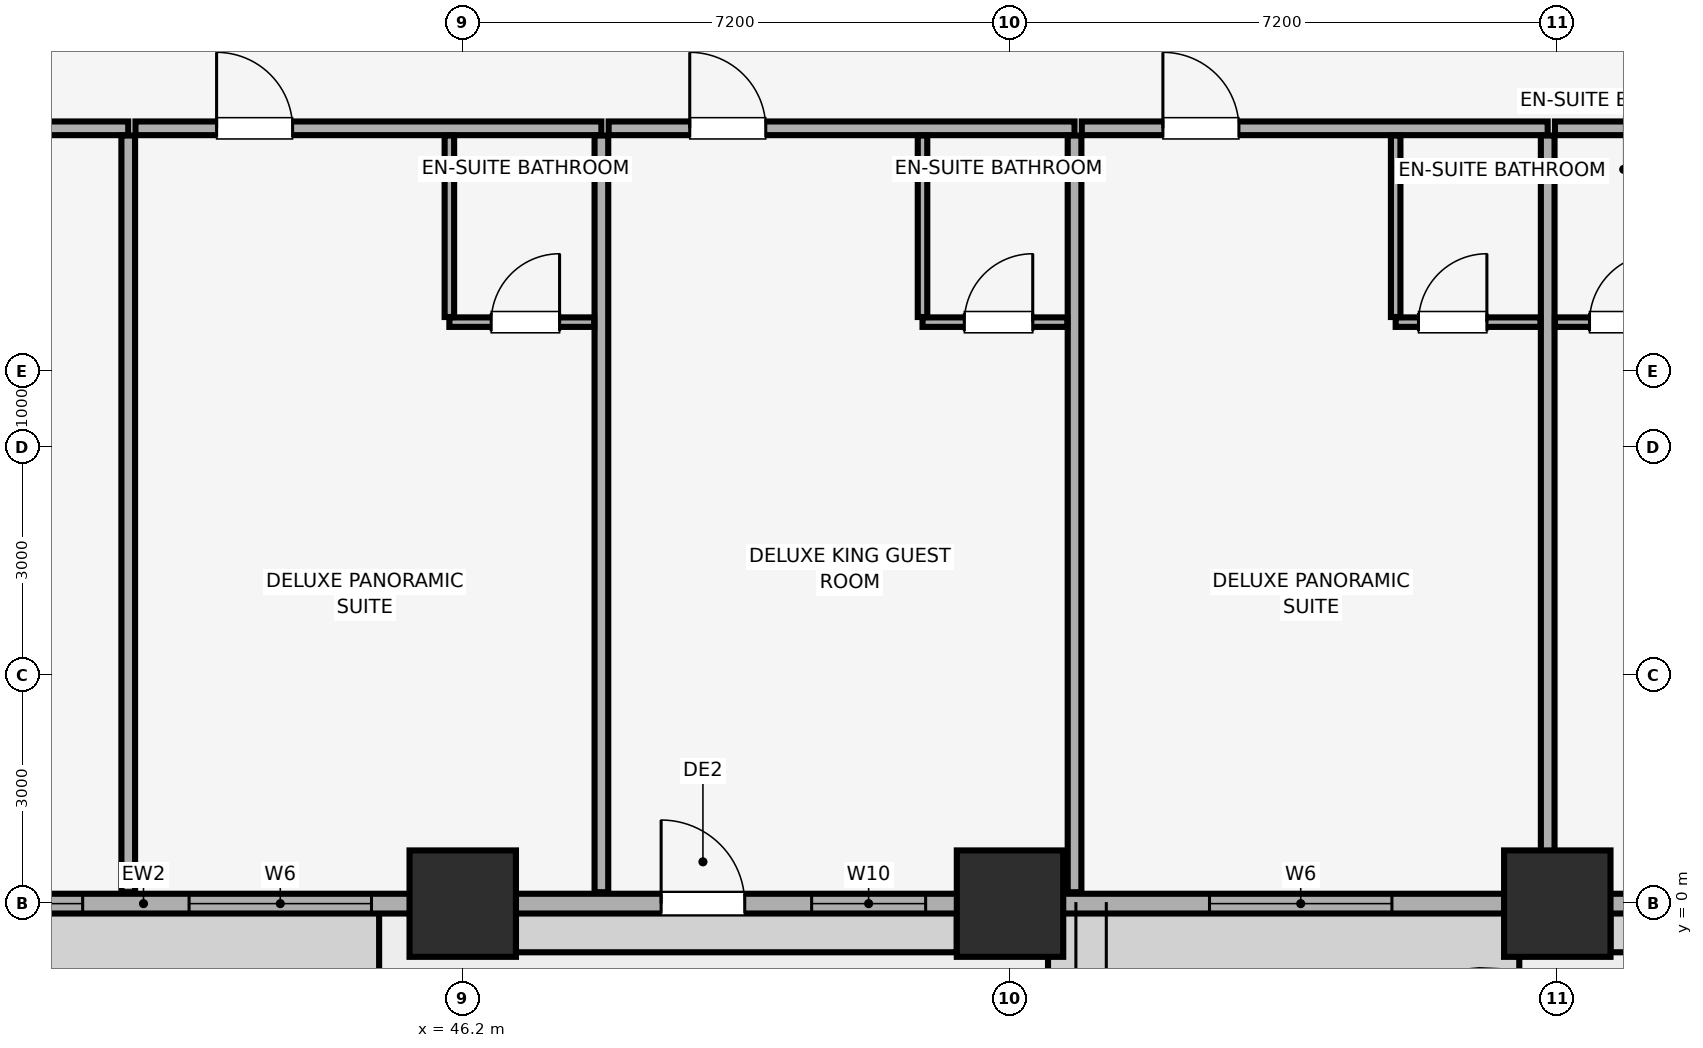
"""IFC4 building model, lengths in metres.
Left out: names, types, materials, properties, quantities, classifications, styles, units other than length and angle.
Written with IfcOpenShell. Run it as: python <this file> out.ifc"""

import sys

from ifc_helpers import new_model, si_unit, direction, frame, frame_2d, origin, origin_2d, place, context, subcontext, project, spatial, rectangle, extrude, element, fill, save


model = new_model("IFC4")
c1 = context("Model", 3, precision=1e-05, world=origin(), true_north=direction((0.0, 1.0)))
c2 = subcontext(c1, "Body", "Model", "MODEL_VIEW")
j1 = project(units=[si_unit("LENGTHUNIT", "METRE"), si_unit("PLANEANGLEUNIT", "RADIAN")], contexts=[c1])
p1 = place(None, origin())
s1 = spatial("IfcSite", under=j1, at=p1, CompositionType="ELEMENT")
p2 = place(p1, origin())
s2 = spatial("IfcBuilding", under=s1, at=p2, CompositionType="ELEMENT")
p3 = place(p2, frame((0.0, 0.0, 46.4)))
s3 = spatial("IfcBuildingStorey", under=s2, at=p3, CompositionType="ELEMENT", Elevation=46.4)
for number, where, z_axis, x_axis in (
    (1, (46.2, 0.0, 0.0), (0.0, 0.0, 1.0), (1.0, 0.0, 0.0)),
    (2, (53.4, 0.0, 0.0), (0.0, 0.0, 1.0), (1.0, 0.0, 0.0)),
    (3, (60.6, 0.0, 0.0), (0.0, 0.0, 1.0), (1.0, 0.0, 0.0)),
):
    element("IfcColumn", number, at=place(p3, frame(where, z_axis=z_axis, x_axis=x_axis)), inside=s3, PredefinedType="COLUMN", context=c2, shape_type="SweptSolid", body=[
        extrude(rectangle(XDim=1.4, YDim=1.4, at=origin_2d()), origin(), (0.0, 0.0, 1.0), 3.51),
    ])
p4 = place(p3, frame((4.2, 0.0, 0.0), z_axis=(0.0, 0.0, 1.0), x_axis=(1.0, 0.0, 0.0)))
e4 = element("IfcWall", 4, at=p4, inside=s3, PredefinedType="SOLIDWALL", context=c2, shape_type="SweptSolid", body=[
    extrude(rectangle(XDim=75.6, YDim=0.26, at=frame_2d((37.8, 0.0))), origin(), (0.0, 0.0, 1.0), 2.56),
])
p5 = place(p4, frame((22.948, 0.0, 0.0)))
e5 = element("IfcOpeningElement", 5, at=p5, cuts=e4, PredefinedType="OPENING", context=c2, shape_type="SweptSolid", body=[
    extrude(rectangle(XDim=1.1, YDim=2.15, at=frame_2d((0.55, 1.075))), frame((0.0, 0.14, 0.0), z_axis=(0.0, -1.0, 0.0), x_axis=(1.0, 0.0, 0.0)), (0.0, 0.0, 1.0), 0.28),
])
p6 = place(p4, frame((44.61, 0.0, 0.0)))
e6 = element("IfcOpeningElement", 6, at=p6, cuts=e4, PredefinedType="OPENING", context=c2, shape_type="SweptSolid", body=[
    extrude(rectangle(XDim=1.1, YDim=2.15, at=frame_2d((0.55, 1.075))), frame((0.0, 0.14, 0.0), z_axis=(0.0, -1.0, 0.0), x_axis=(1.0, 0.0, 0.0)), (0.0, 0.0, 1.0), 0.28),
])
p7 = place(p4, frame((66.272, 0.0, 0.0)))
e7 = element("IfcOpeningElement", 7, at=p7, cuts=e4, PredefinedType="OPENING", context=c2, shape_type="SweptSolid", body=[
    extrude(rectangle(XDim=1.1, YDim=2.15, at=frame_2d((0.55, 1.075))), frame((0.0, 0.14, 0.0), z_axis=(0.0, -1.0, 0.0), x_axis=(1.0, 0.0, 0.0)), (0.0, 0.0, 1.0), 0.28),
])
p8 = place(p4, frame((1.035, 0.0, 0.85)))
e8 = element("IfcOpeningElement", 8, at=p8, cuts=e4, PredefinedType="OPENING", context=c2, shape_type="SweptSolid", body=[
    extrude(rectangle(XDim=2.4, YDim=1.5, at=frame_2d((1.2, 0.75))), frame((0.0, 0.14, 0.0), z_axis=(0.0, -1.0, 0.0), x_axis=(1.0, 0.0, 0.0)), (0.0, 0.0, 1.0), 0.28),
])
p9 = place(p4, frame((7.837, 0.0, 0.85)))
e9 = element("IfcOpeningElement", 9, at=p9, cuts=e4, PredefinedType="OPENING", context=c2, shape_type="SweptSolid", body=[
    extrude(rectangle(XDim=2.4, YDim=1.5, at=frame_2d((1.2, 0.75))), frame((0.0, 0.14, 0.0), z_axis=(0.0, -1.0, 0.0), x_axis=(1.0, 0.0, 0.0)), (0.0, 0.0, 1.0), 0.28),
])
p10 = place(p4, frame((14.55, 0.0, 0.85)))
e10 = element("IfcOpeningElement", 10, at=p10, cuts=e4, PredefinedType="OPENING", context=c2, shape_type="SweptSolid", body=[
    extrude(rectangle(XDim=2.4, YDim=1.5, at=frame_2d((1.2, 0.75))), frame((0.0, 0.14, 0.0), z_axis=(0.0, -1.0, 0.0), x_axis=(1.0, 0.0, 0.0)), (0.0, 0.0, 1.0), 0.28),
])
p11 = place(p4, frame((20.439, 0.0, 0.85)))
e11 = element("IfcOpeningElement", 11, at=p11, cuts=e4, PredefinedType="OPENING", context=c2, shape_type="SweptSolid", body=[
    extrude(rectangle(XDim=1.5, YDim=1.4, at=frame_2d((0.75, 0.7))), frame((0.0, 0.14, 0.0), z_axis=(0.0, -1.0, 0.0), x_axis=(1.0, 0.0, 0.0)), (0.0, 0.0, 1.0), 0.28),
])
p12 = place(p4, frame((27.887, 0.0, 0.85)))
e12 = element("IfcOpeningElement", 12, at=p12, cuts=e4, PredefinedType="OPENING", context=c2, shape_type="SweptSolid", body=[
    extrude(rectangle(XDim=2.4, YDim=1.5, at=frame_2d((1.2, 0.75))), frame((0.0, 0.14, 0.0), z_axis=(0.0, -1.0, 0.0), x_axis=(1.0, 0.0, 0.0)), (0.0, 0.0, 1.0), 0.28),
])
p13 = place(p4, frame((34.6, 0.0, 0.85)))
e13 = element("IfcOpeningElement", 13, at=p13, cuts=e4, PredefinedType="OPENING", context=c2, shape_type="SweptSolid", body=[
    extrude(rectangle(XDim=2.4, YDim=1.5, at=frame_2d((1.2, 0.75))), frame((0.0, 0.14, 0.0), z_axis=(0.0, -1.0, 0.0), x_axis=(1.0, 0.0, 0.0)), (0.0, 0.0, 1.0), 0.28),
])
p14 = place(p4, frame((38.399, 0.0, 0.85)))
e14 = element("IfcOpeningElement", 14, at=p14, cuts=e4, PredefinedType="OPENING", context=c2, shape_type="SweptSolid", body=[
    extrude(rectangle(XDim=2.4, YDim=1.5, at=frame_2d((1.2, 0.75))), frame((0.0, 0.14, 0.0), z_axis=(0.0, -1.0, 0.0), x_axis=(1.0, 0.0, 0.0)), (0.0, 0.0, 1.0), 0.28),
])
p15 = place(p4, frame((46.59, 0.0, 0.85)))
e15 = element("IfcOpeningElement", 15, at=p15, cuts=e4, PredefinedType="OPENING", context=c2, shape_type="SweptSolid", body=[
    extrude(rectangle(XDim=1.5, YDim=1.4, at=frame_2d((0.75, 0.7))), frame((0.0, 0.14, 0.0), z_axis=(0.0, -1.0, 0.0), x_axis=(1.0, 0.0, 0.0)), (0.0, 0.0, 1.0), 0.28),
])
p16 = place(p4, frame((51.824, 0.0, 0.85)))
e16 = element("IfcOpeningElement", 16, at=p16, cuts=e4, PredefinedType="OPENING", context=c2, shape_type="SweptSolid", body=[
    extrude(rectangle(XDim=2.4, YDim=1.5, at=frame_2d((1.2, 0.75))), frame((0.0, 0.14, 0.0), z_axis=(0.0, -1.0, 0.0), x_axis=(1.0, 0.0, 0.0)), (0.0, 0.0, 1.0), 0.28),
])
p17 = place(p4, frame((58.449, 0.0, 0.85)))
e17 = element("IfcOpeningElement", 17, at=p17, cuts=e4, PredefinedType="OPENING", context=c2, shape_type="SweptSolid", body=[
    extrude(rectangle(XDim=2.4, YDim=1.5, at=frame_2d((1.2, 0.75))), frame((0.0, 0.14, 0.0), z_axis=(0.0, -1.0, 0.0), x_axis=(1.0, 0.0, 0.0)), (0.0, 0.0, 1.0), 0.28),
])
p18 = place(p4, frame((72.165, 0.0, 0.85)))
e18 = element("IfcOpeningElement", 18, at=p18, cuts=e4, PredefinedType="OPENING", context=c2, shape_type="SweptSolid", body=[
    extrude(rectangle(XDim=2.4, YDim=1.5, at=frame_2d((1.2, 0.75))), frame((0.0, 0.14, 0.0), z_axis=(0.0, -1.0, 0.0), x_axis=(1.0, 0.0, 0.0)), (0.0, 0.0, 1.0), 0.28),
])
p19 = place(p3, frame((35.669, 10.2, 0.0), z_axis=(0.0, 0.0, 1.0), x_axis=(1.0, 0.0, 0.0)))
e19 = element("IfcWall", 19, at=p19, inside=s3, PredefinedType="PARTITIONING", context=c2, shape_type="SweptSolid", body=[
    extrude(rectangle(XDim=6.13, YDim=0.18, at=frame_2d((3.065, 0.0))), origin(), (0.0, 0.0, 1.0), 3.51),
])
p20 = place(p19, frame((4.02, 0.0, 0.0)))
e20 = element("IfcOpeningElement", 20, at=p20, cuts=e19, PredefinedType="OPENING", context=c2, shape_type="SweptSolid", body=[
    extrude(rectangle(XDim=1.0, YDim=2.15, at=frame_2d((0.5, 1.075))), frame((0.0, 0.1, 0.0), z_axis=(0.0, -1.0, 0.0), x_axis=(1.0, 0.0, 0.0)), (0.0, 0.0, 1.0), 0.2),
])
p21 = place(p3, frame((41.799, 0.15, 0.0), z_axis=(0.0, 0.0, 1.0), x_axis=(0.0, 1.0, 0.0)))
e21 = element("IfcWall", 21, at=p21, inside=s3, PredefinedType="PARTITIONING", context=c2, shape_type="SweptSolid", body=[
    extrude(rectangle(XDim=9.955, YDim=0.18, at=frame_2d((4.978, 0.0))), origin(), (0.0, 0.0, 1.0), 2.898),
])
p22 = place(p3, frame((41.894, 10.2, 0.0), z_axis=(0.0, 0.0, 1.0), x_axis=(1.0, 0.0, 0.0)))
e22 = element("IfcWall", 22, at=p22, inside=s3, PredefinedType="PARTITIONING", context=c2, shape_type="SweptSolid", body=[
    extrude(rectangle(XDim=6.13, YDim=0.18, at=frame_2d((3.065, 0.0))), origin(), (0.0, 0.0, 1.0), 3.51),
])
p23 = place(p22, frame((1.067, 0.0, 0.0)))
e23 = element("IfcOpeningElement", 23, at=p23, cuts=e22, PredefinedType="OPENING", context=c2, shape_type="SweptSolid", body=[
    extrude(rectangle(XDim=1.0, YDim=2.15, at=frame_2d((0.5, 1.075))), frame((0.0, 0.1, 0.0), z_axis=(0.0, -1.0, 0.0), x_axis=(1.0, 0.0, 0.0)), (0.0, 0.0, 1.0), 0.2),
])
p24 = place(p3, frame((48.024, 0.15, 0.0), z_axis=(0.0, 0.0, 1.0), x_axis=(0.0, 1.0, 0.0)))
e24 = element("IfcWall", 24, at=p24, inside=s3, PredefinedType="PARTITIONING", context=c2, shape_type="SweptSolid", body=[
    extrude(rectangle(XDim=9.955, YDim=0.18, at=frame_2d((4.978, 0.0))), origin(), (0.0, 0.0, 1.0), 3.51),
])
p25 = place(p3, frame((46.024, 7.65, 0.0), z_axis=(0.0, 0.0, 1.0), x_axis=(1.0, 0.0, 0.0)))
e25 = element("IfcWall", 25, at=p25, inside=s3, PredefinedType="PARTITIONING", context=c2, shape_type="SweptSolid", body=[
    extrude(rectangle(XDim=1.905, YDim=0.125, at=frame_2d((0.953, 0.0))), origin(), (0.0, 0.0, 1.0), 3.51),
])
p26 = place(p25, frame((0.55, 0.0, 0.0)))
e26 = element("IfcOpeningElement", 26, at=p26, cuts=e25, PredefinedType="OPENING", context=c2, shape_type="SweptSolid", body=[
    extrude(rectangle(XDim=0.9, YDim=2.1, at=frame_2d((0.45, 1.05))), frame((0.0, 0.073, 0.0), z_axis=(0.0, -1.0, 0.0), x_axis=(1.0, 0.0, 0.0)), (0.0, 0.0, 1.0), 0.145),
])
p27 = place(p3, frame((46.024, 7.718, 0.0), z_axis=(0.0, 0.0, 1.0), x_axis=(0.0, 1.0, 0.0)))
e27 = element("IfcWall", 27, at=p27, inside=s3, PredefinedType="PARTITIONING", context=c2, shape_type="SweptSolid", body=[
    extrude(rectangle(XDim=2.387, YDim=0.125, at=frame_2d((1.194, 0.0))), origin(), (0.0, 0.0, 1.0), 2.898),
])
p28 = place(p3, frame((48.119, 10.2, 0.0), z_axis=(0.0, 0.0, 1.0), x_axis=(1.0, 0.0, 0.0)))
e28 = element("IfcWall", 28, at=p28, inside=s3, PredefinedType="PARTITIONING", context=c2, shape_type="SweptSolid", body=[
    extrude(rectangle(XDim=6.13, YDim=0.18, at=frame_2d((3.065, 0.0))), origin(), (0.0, 0.0, 1.0), 3.51),
])
p29 = place(p28, frame((1.067, 0.0, 0.0)))
e29 = element("IfcOpeningElement", 29, at=p29, cuts=e28, PredefinedType="OPENING", context=c2, shape_type="SweptSolid", body=[
    extrude(rectangle(XDim=1.0, YDim=2.15, at=frame_2d((0.5, 1.075))), frame((0.0, 0.1, 0.0), z_axis=(0.0, -1.0, 0.0), x_axis=(1.0, 0.0, 0.0)), (0.0, 0.0, 1.0), 0.2),
])
p30 = place(p3, frame((54.249, 0.15, 0.0), z_axis=(0.0, 0.0, 1.0), x_axis=(0.0, 1.0, 0.0)))
e30 = element("IfcWall", 30, at=p30, inside=s3, PredefinedType="PARTITIONING", context=c2, shape_type="SweptSolid", body=[
    extrude(rectangle(XDim=9.955, YDim=0.18, at=frame_2d((4.978, 0.0))), origin(), (0.0, 0.0, 1.0), 3.51),
])
p31 = place(p3, frame((52.249, 7.65, 0.0), z_axis=(0.0, 0.0, 1.0), x_axis=(1.0, 0.0, 0.0)))
e31 = element("IfcWall", 31, at=p31, inside=s3, PredefinedType="PARTITIONING", context=c2, shape_type="SweptSolid", body=[
    extrude(rectangle(XDim=1.905, YDim=0.125, at=frame_2d((0.953, 0.0))), origin(), (0.0, 0.0, 1.0), 3.51),
])
p32 = place(p31, frame((0.55, 0.0, 0.0)))
e32 = element("IfcOpeningElement", 32, at=p32, cuts=e31, PredefinedType="OPENING", context=c2, shape_type="SweptSolid", body=[
    extrude(rectangle(XDim=0.9, YDim=2.1, at=frame_2d((0.45, 1.05))), frame((0.0, 0.073, 0.0), z_axis=(0.0, -1.0, 0.0), x_axis=(1.0, 0.0, 0.0)), (0.0, 0.0, 1.0), 0.145),
])
p33 = place(p3, frame((52.249, 7.718, 0.0), z_axis=(0.0, 0.0, 1.0), x_axis=(0.0, 1.0, 0.0)))
e33 = element("IfcWall", 33, at=p33, inside=s3, PredefinedType="PARTITIONING", context=c2, shape_type="SweptSolid", body=[
    extrude(rectangle(XDim=2.387, YDim=0.125, at=frame_2d((1.194, 0.0))), origin(), (0.0, 0.0, 1.0), 3.51),
])
p34 = place(p3, frame((54.344, 10.2, 0.0), z_axis=(0.0, 0.0, 1.0), x_axis=(1.0, 0.0, 0.0)))
e34 = element("IfcWall", 34, at=p34, inside=s3, PredefinedType="PARTITIONING", context=c2, shape_type="SweptSolid", body=[
    extrude(rectangle(XDim=6.13, YDim=0.18, at=frame_2d((3.065, 0.0))), origin(), (0.0, 0.0, 1.0), 3.51),
])
p35 = place(p34, frame((1.067, 0.0, 0.0)))
e35 = element("IfcOpeningElement", 35, at=p35, cuts=e34, PredefinedType="OPENING", context=c2, shape_type="SweptSolid", body=[
    extrude(rectangle(XDim=1.0, YDim=2.15, at=frame_2d((0.5, 1.075))), frame((0.0, 0.1, 0.0), z_axis=(0.0, -1.0, 0.0), x_axis=(1.0, 0.0, 0.0)), (0.0, 0.0, 1.0), 0.2),
])
p36 = place(p3, frame((60.474, 0.15, 0.0), z_axis=(0.0, 0.0, 1.0), x_axis=(0.0, 1.0, 0.0)))
e36 = element("IfcWall", 36, at=p36, inside=s3, PredefinedType="PARTITIONING", context=c2, shape_type="SweptSolid", body=[
    extrude(rectangle(XDim=9.955, YDim=0.18, at=frame_2d((4.978, 0.0))), origin(), (0.0, 0.0, 1.0), 2.898),
])
p37 = place(p3, frame((58.474, 7.65, 0.0), z_axis=(0.0, 0.0, 1.0), x_axis=(1.0, 0.0, 0.0)))
e37 = element("IfcWall", 37, at=p37, inside=s3, PredefinedType="PARTITIONING", context=c2, shape_type="SweptSolid", body=[
    extrude(rectangle(XDim=1.905, YDim=0.125, at=frame_2d((0.953, 0.0))), origin(), (0.0, 0.0, 1.0), 3.51),
])
p38 = place(p37, frame((0.3, 0.0, 0.0)))
e38 = element("IfcOpeningElement", 38, at=p38, cuts=e37, PredefinedType="OPENING", context=c2, shape_type="SweptSolid", body=[
    extrude(rectangle(XDim=0.9, YDim=2.1, at=frame_2d((0.45, 1.05))), frame((0.0, 0.073, 0.0), z_axis=(0.0, -1.0, 0.0), x_axis=(1.0, 0.0, 0.0)), (0.0, 0.0, 1.0), 0.145),
])
p39 = place(p3, frame((58.474, 7.718, 0.0), z_axis=(0.0, 0.0, 1.0), x_axis=(0.0, 1.0, 0.0)))
e39 = element("IfcWall", 39, at=p39, inside=s3, PredefinedType="PARTITIONING", context=c2, shape_type="SweptSolid", body=[
    extrude(rectangle(XDim=2.387, YDim=0.125, at=frame_2d((1.194, 0.0))), origin(), (0.0, 0.0, 1.0), 3.51),
])
p40 = place(p3, frame((60.569, 10.2, 0.0), z_axis=(0.0, 0.0, 1.0), x_axis=(1.0, 0.0, 0.0)))
e40 = element("IfcWall", 40, at=p40, inside=s3, PredefinedType="PARTITIONING", context=c2, shape_type="SweptSolid", body=[
    extrude(rectangle(XDim=6.13, YDim=0.18, at=frame_2d((3.065, 0.0))), origin(), (0.0, 0.0, 1.0), 3.51),
])
p41 = place(p40, frame((3.967, 0.0, 0.0)))
e41 = element("IfcOpeningElement", 41, at=p41, cuts=e40, PredefinedType="OPENING", context=c2, shape_type="SweptSolid", body=[
    extrude(rectangle(XDim=1.0, YDim=2.15, at=frame_2d((0.5, 1.075))), frame((0.0, 0.1, 0.0), z_axis=(0.0, -1.0, 0.0), x_axis=(1.0, 0.0, 0.0)), (0.0, 0.0, 1.0), 0.2),
])
p42 = place(p3, frame((60.569, 7.65, 0.0), z_axis=(0.0, 0.0, 1.0), x_axis=(1.0, 0.0, 0.0)))
e42 = element("IfcWall", 42, at=p42, inside=s3, PredefinedType="PARTITIONING", context=c2, shape_type="SweptSolid", body=[
    extrude(rectangle(XDim=1.905, YDim=0.125, at=frame_2d((0.953, 0.0))), origin(), (0.0, 0.0, 1.0), 3.51),
])
p43 = place(p42, frame((0.455, 0.0, 0.0)))
e43 = element("IfcOpeningElement", 43, at=p43, cuts=e42, PredefinedType="OPENING", context=c2, shape_type="SweptSolid", body=[
    extrude(rectangle(XDim=0.9, YDim=2.1, at=frame_2d((0.45, 1.05))), frame((0.0, 0.073, 0.0), z_axis=(0.0, -1.0, 0.0), x_axis=(1.0, 0.0, 0.0)), (0.0, 0.0, 1.0), 0.145),
])
p44 = place(p6, origin())
e44 = element("IfcDoor", 44, at=p44, inside=s3, OperationType="SINGLE_SWING_LEFT", PredefinedType="DOOR", context=c2, shape_type="SweptSolid", body=[
    extrude(rectangle(XDim=1.1, YDim=2.15, at=frame_2d((0.55, 1.075))), frame((0.0, 0.025, 0.0), z_axis=(0.0, -1.0, 0.0), x_axis=(1.0, 0.0, 0.0)), (0.0, 0.0, 1.0), 0.05),
])
fill(e6, e44)
p45 = place(p13, origin())
e45 = element("IfcWindow", 45, at=p45, inside=s3, PartitioningType="SINGLE_PANEL", PredefinedType="WINDOW", context=c2, shape_type="SweptSolid", body=[
    extrude(rectangle(XDim=2.4, YDim=1.5, at=frame_2d((1.2, 0.75))), frame((0.0, 0.03, 0.0), z_axis=(0.0, -1.0, 0.0), x_axis=(1.0, 0.0, 0.0)), (0.0, 0.0, 1.0), 0.06),
])
fill(e13, e45)
p46 = place(p14, origin())
e46 = element("IfcWindow", 46, at=p46, inside=s3, PartitioningType="SINGLE_PANEL", PredefinedType="WINDOW", context=c2, shape_type="SweptSolid", body=[
    extrude(rectangle(XDim=2.4, YDim=1.5, at=frame_2d((1.2, 0.75))), frame((0.0, 0.03, 0.0), z_axis=(0.0, -1.0, 0.0), x_axis=(1.0, 0.0, 0.0)), (0.0, 0.0, 1.0), 0.06),
])
fill(e14, e46)
p47 = place(p15, origin())
e47 = element("IfcWindow", 47, at=p47, inside=s3, PartitioningType="SINGLE_PANEL", PredefinedType="WINDOW", context=c2, shape_type="SweptSolid", body=[
    extrude(rectangle(XDim=1.5, YDim=1.4, at=frame_2d((0.75, 0.7))), frame((0.0, 0.03, 0.0), z_axis=(0.0, -1.0, 0.0), x_axis=(1.0, 0.0, 0.0)), (0.0, 0.0, 1.0), 0.06),
])
fill(e15, e47)
p48 = place(p16, origin())
e48 = element("IfcWindow", 48, at=p48, inside=s3, PartitioningType="SINGLE_PANEL", PredefinedType="WINDOW", context=c2, shape_type="SweptSolid", body=[
    extrude(rectangle(XDim=2.4, YDim=1.5, at=frame_2d((1.2, 0.75))), frame((0.0, 0.03, 0.0), z_axis=(0.0, -1.0, 0.0), x_axis=(1.0, 0.0, 0.0)), (0.0, 0.0, 1.0), 0.06),
])
fill(e16, e48)
p49 = place(p23, origin())
e49 = element("IfcDoor", 49, at=p49, inside=s3, OperationType="SINGLE_SWING_LEFT", PredefinedType="DOOR", context=c2, shape_type="SweptSolid", body=[
    extrude(rectangle(XDim=1.0, YDim=2.15, at=frame_2d((0.5, 1.075))), frame((0.0, 0.025, 0.0), z_axis=(0.0, -1.0, 0.0), x_axis=(1.0, 0.0, 0.0)), (0.0, 0.0, 1.0), 0.05),
])
fill(e23, e49)
p50 = place(p26, origin())
e50 = element("IfcDoor", 50, at=p50, inside=s3, OperationType="SINGLE_SWING_RIGHT", PredefinedType="DOOR", context=c2, shape_type="SweptSolid", body=[
    extrude(rectangle(XDim=0.9, YDim=2.1, at=frame_2d((0.45, 1.05))), frame((0.0, 0.025, 0.0), z_axis=(0.0, -1.0, 0.0), x_axis=(1.0, 0.0, 0.0)), (0.0, 0.0, 1.0), 0.05),
])
fill(e26, e50)
p51 = place(p29, origin())
e51 = element("IfcDoor", 51, at=p51, inside=s3, OperationType="SINGLE_SWING_LEFT", PredefinedType="DOOR", context=c2, shape_type="SweptSolid", body=[
    extrude(rectangle(XDim=1.0, YDim=2.15, at=frame_2d((0.5, 1.075))), frame((0.0, 0.025, 0.0), z_axis=(0.0, -1.0, 0.0), x_axis=(1.0, 0.0, 0.0)), (0.0, 0.0, 1.0), 0.05),
])
fill(e29, e51)
p52 = place(p32, origin())
e52 = element("IfcDoor", 52, at=p52, inside=s3, OperationType="SINGLE_SWING_RIGHT", PredefinedType="DOOR", context=c2, shape_type="SweptSolid", body=[
    extrude(rectangle(XDim=0.9, YDim=2.1, at=frame_2d((0.45, 1.05))), frame((0.0, 0.025, 0.0), z_axis=(0.0, -1.0, 0.0), x_axis=(1.0, 0.0, 0.0)), (0.0, 0.0, 1.0), 0.05),
])
fill(e32, e52)
p53 = place(p35, origin())
e53 = element("IfcDoor", 53, at=p53, inside=s3, OperationType="SINGLE_SWING_LEFT", PredefinedType="DOOR", context=c2, shape_type="SweptSolid", body=[
    extrude(rectangle(XDim=1.0, YDim=2.15, at=frame_2d((0.5, 1.075))), frame((0.0, 0.025, 0.0), z_axis=(0.0, -1.0, 0.0), x_axis=(1.0, 0.0, 0.0)), (0.0, 0.0, 1.0), 0.05),
])
fill(e35, e53)
p54 = place(p38, origin())
e54 = element("IfcDoor", 54, at=p54, inside=s3, OperationType="SINGLE_SWING_RIGHT", PredefinedType="DOOR", context=c2, shape_type="SweptSolid", body=[
    extrude(rectangle(XDim=0.9, YDim=2.1, at=frame_2d((0.45, 1.05))), frame((0.0, 0.025, 0.0), z_axis=(0.0, -1.0, 0.0), x_axis=(1.0, 0.0, 0.0)), (0.0, 0.0, 1.0), 0.05),
])
fill(e38, e54)
p55 = place(p43, origin())
e55 = element("IfcDoor", 55, at=p55, inside=s3, OperationType="SINGLE_SWING_RIGHT", PredefinedType="DOOR", context=c2, shape_type="SweptSolid", body=[
    extrude(rectangle(XDim=0.9, YDim=2.1, at=frame_2d((0.45, 1.05))), frame((0.0, 0.025, 0.0), z_axis=(0.0, -1.0, 0.0), x_axis=(1.0, 0.0, 0.0)), (0.0, 0.0, 1.0), 0.05),
])
fill(e43, e55)
save(model, sys.argv[1])
